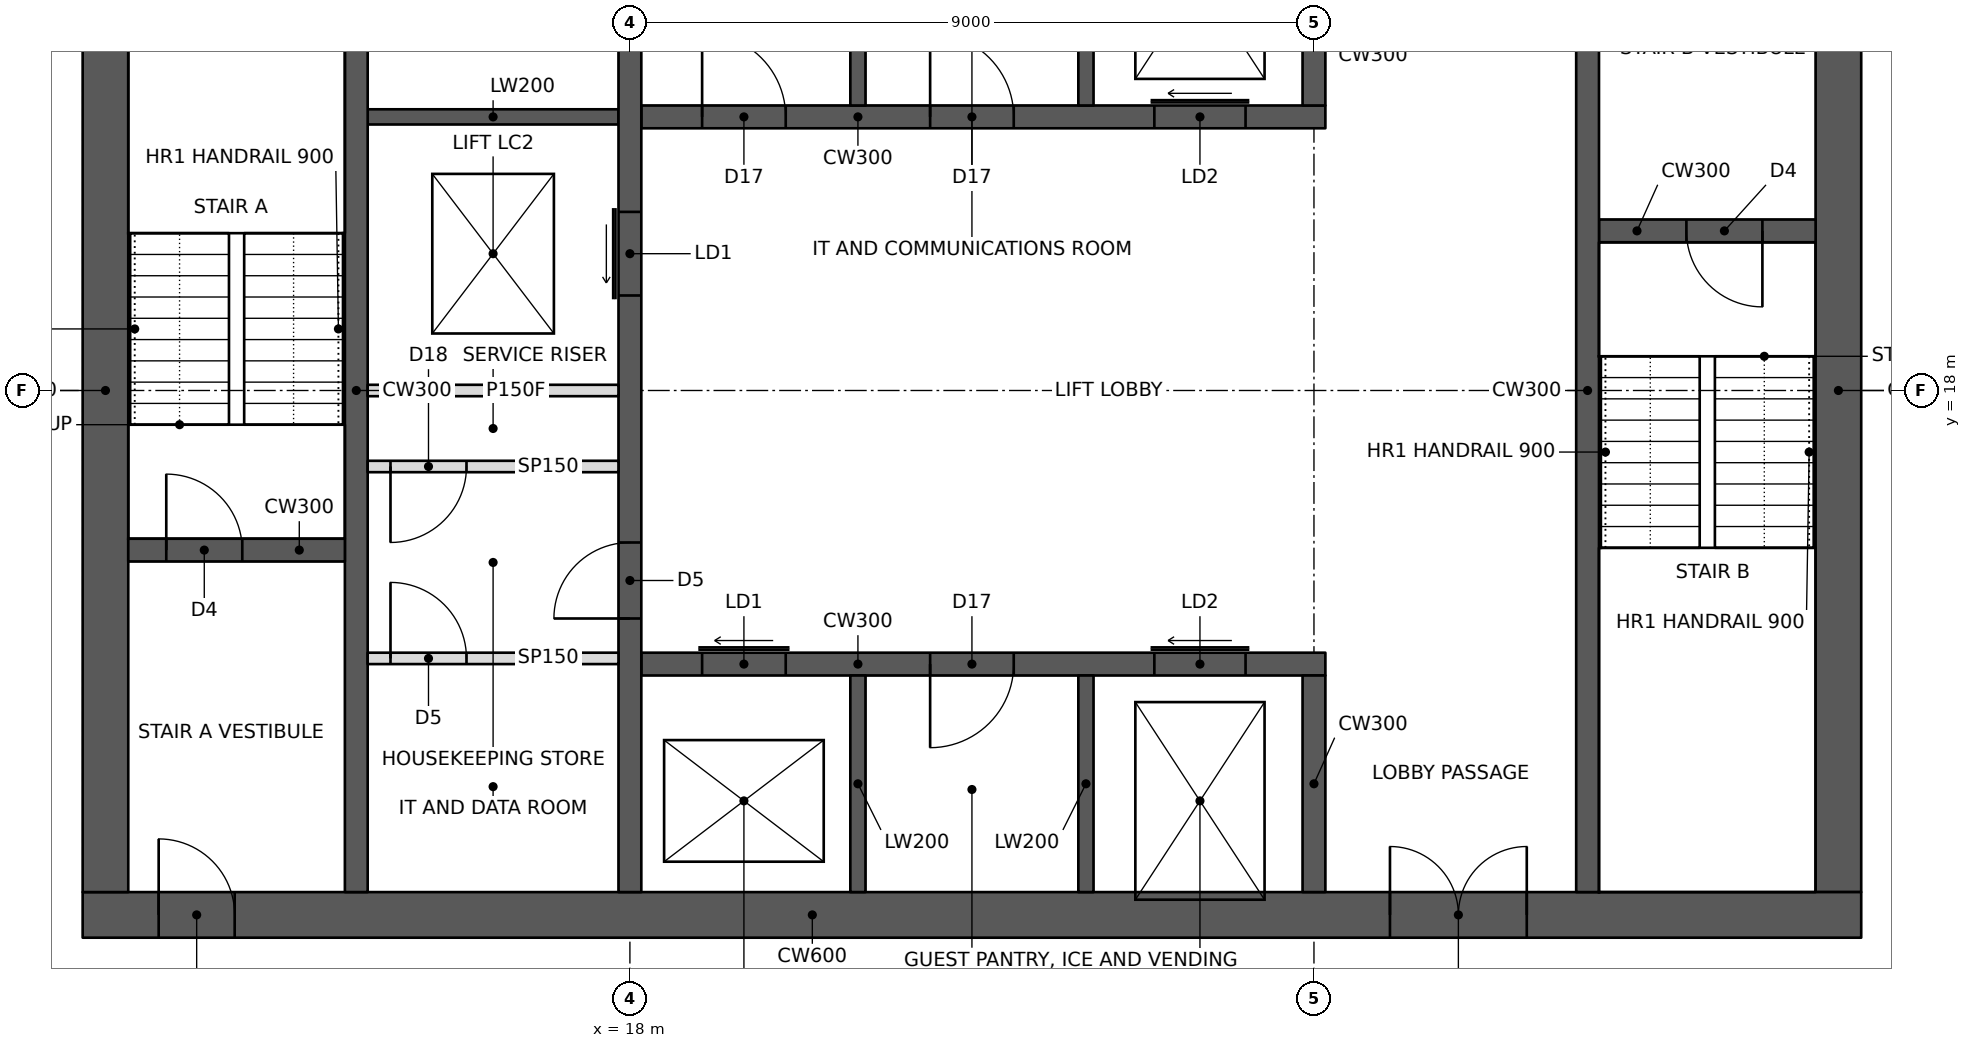
"""IFC4 building model, lengths in metres.
Left out: names, types, materials, properties, quantities, classifications, styles, units other than length and angle.
Written with IfcOpenShell. Run it as: python <this file> out.ifc"""

import sys

from ifc_helpers import new_model, si_unit, direction, frame, frame_2d, origin, place, context, subcontext, project, spatial, rectangle, extrude, element, fill, save


model = new_model("IFC4")
c1 = context("Model", 3, precision=1e-05, world=origin(), true_north=direction((0.0, 1.0)))
c2 = subcontext(c1, "Body", "Model", "MODEL_VIEW")
j1 = project(units=[si_unit("LENGTHUNIT", "METRE"), si_unit("PLANEANGLEUNIT", "RADIAN")], contexts=[c1])
p1 = place(None, origin())
s1 = spatial("IfcSite", under=j1, at=p1, CompositionType="ELEMENT")
p2 = place(p1, origin())
s2 = spatial("IfcBuilding", under=s1, at=p2, CompositionType="ELEMENT")
p3 = place(p2, frame((0.0, 0.0, 201.2)))
s3 = spatial("IfcBuildingStorey", under=s2, at=p3, CompositionType="ELEMENT", Elevation=201.2)
p4 = place(p3, frame((10.8, 11.1, 0.0), z_axis=(0.0, 0.0, 1.0), x_axis=(1.0, 0.0, 0.0)))
e1 = element("IfcWall", 1, at=p4, inside=s3, PredefinedType="SHEAR", context=c2, shape_type="SweptSolid", body=[
    extrude(rectangle(XDim=23.4, YDim=0.6, at=frame_2d((11.7, 0.0))), origin(), (0.0, 0.0, 1.0), 3.4),
])
p5 = place(p4, frame((1.0, 0.0, 0.0)))
e2 = element("IfcOpeningElement", 2, at=p5, cuts=e1, PredefinedType="OPENING", context=c2, shape_type="SweptSolid", body=[
    extrude(rectangle(XDim=1.0, YDim=2.1, at=frame_2d((0.5, 1.05))), frame((0.0, 0.31, 0.0), z_axis=(0.0, -1.0, 0.0), x_axis=(1.0, 0.0, 0.0)), (0.0, 0.0, 1.0), 0.62),
])
p6 = place(p4, frame((17.2, 0.0, 0.0)))
e3 = element("IfcOpeningElement", 3, at=p6, cuts=e1, PredefinedType="OPENING", context=c2, shape_type="SweptSolid", body=[
    extrude(rectangle(XDim=1.8, YDim=2.1, at=frame_2d((0.9, 1.05))), frame((0.0, 0.31, 0.0), z_axis=(0.0, -1.0, 0.0), x_axis=(1.0, 0.0, 0.0)), (0.0, 0.0, 1.0), 0.62),
])
for number, where, z_axis, x_axis in (
    (4, (11.1, 11.4, 0.0), (0.0, 0.0, 1.0), (0.0, 1.0, 0.0)),
    (5, (33.9, 11.4, 0.0), (0.0, 0.0, 1.0), (0.0, 1.0, 0.0)),
):
    element("IfcWall", number, at=place(p3, frame(where, z_axis=z_axis, x_axis=x_axis)), inside=s3, PredefinedType="SHEAR", context=c2, shape_type="SweptSolid", body=[
        extrude(rectangle(XDim=13.2, YDim=0.6, at=frame_2d((6.6, 0.0))), origin(), (0.0, 0.0, 1.0), 3.4),
    ])
p7 = place(p3, frame((14.4, 11.4, 0.0), z_axis=(0.0, 0.0, 1.0), x_axis=(0.0, 1.0, 0.0)))
e6 = element("IfcWall", 6, at=p7, inside=s3, PredefinedType="SHEAR", context=c2, shape_type="SweptSolid", body=[
    extrude(rectangle(XDim=13.2, YDim=0.3, at=frame_2d((6.6, 0.0))), origin(), (0.0, 0.0, 1.0), 3.4),
])
p8 = place(p3, frame((11.4, 15.9, 0.0), z_axis=(0.0, 0.0, 1.0), x_axis=(1.0, 0.0, 0.0)))
e7 = element("IfcWall", 7, at=p8, inside=s3, PredefinedType="SHEAR", context=c2, shape_type="SweptSolid", body=[
    extrude(rectangle(XDim=2.85, YDim=0.3, at=frame_2d((1.425, 0.0))), origin(), (0.0, 0.0, 1.0), 3.4),
])
p9 = place(p8, frame((0.5, 0.0, 0.0)))
e8 = element("IfcOpeningElement", 8, at=p9, cuts=e7, PredefinedType="OPENING", context=c2, shape_type="SweptSolid", body=[
    extrude(rectangle(XDim=1.0, YDim=2.1, at=frame_2d((0.5, 1.05))), frame((0.0, 0.16, 0.0), z_axis=(0.0, -1.0, 0.0), x_axis=(1.0, 0.0, 0.0)), (0.0, 0.0, 1.0), 0.32),
])
p10 = place(p3, frame((18.0, 11.4, 0.0), z_axis=(0.0, 0.0, 1.0), x_axis=(0.0, 1.0, 0.0)))
e9 = element("IfcWall", 9, at=p10, inside=s3, PredefinedType="SHEAR", context=c2, shape_type="SweptSolid", body=[
    extrude(rectangle(XDim=13.2, YDim=0.3, at=frame_2d((6.6, 0.0))), origin(), (0.0, 0.0, 1.0), 3.4),
])
p11 = place(p10, frame((3.6, 0.0, 0.0)))
e10 = element("IfcOpeningElement", 10, at=p11, cuts=e9, PredefinedType="OPENING", context=c2, shape_type="SweptSolid", body=[
    extrude(rectangle(XDim=1.0, YDim=2.1, at=frame_2d((0.5, 1.05))), frame((0.0, 0.16, 0.0), z_axis=(0.0, -1.0, 0.0), x_axis=(1.0, 0.0, 0.0)), (0.0, 0.0, 1.0), 0.32),
])
p12 = place(p10, frame((7.85, 0.0, 0.0)))
e11 = element("IfcOpeningElement", 11, at=p12, cuts=e9, PredefinedType="OPENING", context=c2, shape_type="SweptSolid", body=[
    extrude(rectangle(XDim=1.1, YDim=2.1, at=frame_2d((0.55, 1.05))), frame((0.0, 0.16, 0.0), z_axis=(0.0, -1.0, 0.0), x_axis=(1.0, 0.0, 0.0)), (0.0, 0.0, 1.0), 0.32),
])
p13 = place(p3, frame((14.55, 18.0, 0.0), z_axis=(0.0, 0.0, 1.0), x_axis=(1.0, 0.0, 0.0)))
e12 = element("IfcWall", 12, at=p13, inside=s3, PredefinedType="PARTITIONING", context=c2, shape_type="SweptSolid", body=[
    extrude(rectangle(XDim=3.3, YDim=0.15, at=frame_2d((1.65, 0.0))), origin(), (0.0, 0.0, 1.0), 3.2),
])
p14 = place(p3, frame((18.15, 14.4, 0.0), z_axis=(0.0, 0.0, 1.0), x_axis=(1.0, 0.0, 0.0)))
e13 = element("IfcWall", 13, at=p14, inside=s3, PredefinedType="SHEAR", context=c2, shape_type="SweptSolid", body=[
    extrude(rectangle(XDim=9.0, YDim=0.3, at=frame_2d((4.5, 0.0))), origin(), (0.0, 0.0, 1.0), 3.4),
])
p15 = place(p14, frame((0.8, 0.0, 0.0)))
e14 = element("IfcOpeningElement", 14, at=p15, cuts=e13, PredefinedType="OPENING", context=c2, shape_type="SweptSolid", body=[
    extrude(rectangle(XDim=1.1, YDim=2.1, at=frame_2d((0.55, 1.05))), frame((0.0, 0.16, 0.0), z_axis=(0.0, -1.0, 0.0), x_axis=(1.0, 0.0, 0.0)), (0.0, 0.0, 1.0), 0.32),
])
p16 = place(p14, frame((6.75, 0.0, 0.0)))
e15 = element("IfcOpeningElement", 15, at=p16, cuts=e13, PredefinedType="OPENING", context=c2, shape_type="SweptSolid", body=[
    extrude(rectangle(XDim=1.2, YDim=2.1, at=frame_2d((0.6, 1.05))), frame((0.0, 0.16, 0.0), z_axis=(0.0, -1.0, 0.0), x_axis=(1.0, 0.0, 0.0)), (0.0, 0.0, 1.0), 0.32),
])
p17 = place(p14, frame((3.8, 0.0, 0.0)))
e16 = element("IfcOpeningElement", 16, at=p17, cuts=e13, PredefinedType="OPENING", context=c2, shape_type="SweptSolid", body=[
    extrude(rectangle(XDim=1.1, YDim=2.1, at=frame_2d((0.55, 1.05))), frame((0.0, 0.16, 0.0), z_axis=(0.0, -1.0, 0.0), x_axis=(1.0, 0.0, 0.0)), (0.0, 0.0, 1.0), 0.32),
])
p18 = place(p3, frame((27.0, 11.4, 0.0), z_axis=(0.0, 0.0, 1.0), x_axis=(0.0, 1.0, 0.0)))
e17 = element("IfcWall", 17, at=p18, inside=s3, PredefinedType="SHEAR", context=c2, shape_type="SweptSolid", body=[
    extrude(rectangle(XDim=2.85, YDim=0.3, at=frame_2d((1.425, 0.0))), origin(), (0.0, 0.0, 1.0), 3.4),
])
for number, where, z_axis, x_axis in (
    (18, (21.0, 11.4, 0.0), (0.0, 0.0, 1.0), (0.0, 1.0, 0.0)),
    (19, (24.0, 11.4, 0.0), (0.0, 0.0, 1.0), (0.0, 1.0, 0.0)),
):
    element("IfcWall", number, at=place(p3, frame(where, z_axis=z_axis, x_axis=x_axis)), inside=s3, PredefinedType="SHEAR", context=c2, shape_type="SweptSolid", body=[
        extrude(rectangle(XDim=2.85, YDim=0.2, at=frame_2d((1.425, 0.0))), origin(), (0.0, 0.0, 1.0), 3.4),
    ])
p19 = place(p3, frame((18.15, 21.6, 0.0), z_axis=(0.0, 0.0, 1.0), x_axis=(1.0, 0.0, 0.0)))
e20 = element("IfcWall", 20, at=p19, inside=s3, PredefinedType="SHEAR", context=c2, shape_type="SweptSolid", body=[
    extrude(rectangle(XDim=9.0, YDim=0.3, at=frame_2d((4.5, 0.0))), origin(), (0.0, 0.0, 1.0), 3.4),
])
p20 = place(p19, frame((6.75, 0.0, 0.0)))
e21 = element("IfcOpeningElement", 21, at=p20, cuts=e20, PredefinedType="OPENING", context=c2, shape_type="SweptSolid", body=[
    extrude(rectangle(XDim=1.2, YDim=2.1, at=frame_2d((0.6, 1.05))), frame((0.0, 0.16, 0.0), z_axis=(0.0, -1.0, 0.0), x_axis=(1.0, 0.0, 0.0)), (0.0, 0.0, 1.0), 0.32),
])
p21 = place(p19, frame((0.8, 0.0, 0.0)))
e22 = element("IfcOpeningElement", 22, at=p21, cuts=e20, PredefinedType="OPENING", context=c2, shape_type="SweptSolid", body=[
    extrude(rectangle(XDim=1.1, YDim=2.1, at=frame_2d((0.55, 1.05))), frame((0.0, 0.16, 0.0), z_axis=(0.0, -1.0, 0.0), x_axis=(1.0, 0.0, 0.0)), (0.0, 0.0, 1.0), 0.32),
])
p22 = place(p19, frame((3.8, 0.0, 0.0)))
e23 = element("IfcOpeningElement", 23, at=p22, cuts=e20, PredefinedType="OPENING", context=c2, shape_type="SweptSolid", body=[
    extrude(rectangle(XDim=1.1, YDim=2.1, at=frame_2d((0.55, 1.05))), frame((0.0, 0.16, 0.0), z_axis=(0.0, -1.0, 0.0), x_axis=(1.0, 0.0, 0.0)), (0.0, 0.0, 1.0), 0.32),
])
p23 = place(p3, frame((27.0, 21.75, 0.0), z_axis=(0.0, 0.0, 1.0), x_axis=(0.0, 1.0, 0.0)))
e24 = element("IfcWall", 24, at=p23, inside=s3, PredefinedType="SHEAR", context=c2, shape_type="SweptSolid", body=[
    extrude(rectangle(XDim=2.85, YDim=0.3, at=frame_2d((1.425, 0.0))), origin(), (0.0, 0.0, 1.0), 3.4),
])
for number, where, z_axis, x_axis in (
    (25, (21.0, 21.75, 0.0), (0.0, 0.0, 1.0), (0.0, 1.0, 0.0)),
    (26, (24.0, 21.75, 0.0), (0.0, 0.0, 1.0), (0.0, 1.0, 0.0)),
):
    element("IfcWall", number, at=place(p3, frame(where, z_axis=z_axis, x_axis=x_axis)), inside=s3, PredefinedType="SHEAR", context=c2, shape_type="SweptSolid", body=[
        extrude(rectangle(XDim=2.85, YDim=0.2, at=frame_2d((1.425, 0.0))), origin(), (0.0, 0.0, 1.0), 3.4),
    ])
p24 = place(p3, frame((30.6, 11.4, 0.0), z_axis=(0.0, 0.0, 1.0), x_axis=(0.0, 1.0, 0.0)))
e27 = element("IfcWall", 27, at=p24, inside=s3, PredefinedType="SHEAR", context=c2, shape_type="SweptSolid", body=[
    extrude(rectangle(XDim=13.2, YDim=0.3, at=frame_2d((6.6, 0.0))), origin(), (0.0, 0.0, 1.0), 3.4),
])
p25 = place(p3, frame((30.75, 20.1, 0.0), z_axis=(0.0, 0.0, 1.0), x_axis=(1.0, 0.0, 0.0)))
e28 = element("IfcWall", 28, at=p25, inside=s3, PredefinedType="SHEAR", context=c2, shape_type="SweptSolid", body=[
    extrude(rectangle(XDim=2.85, YDim=0.3, at=frame_2d((1.425, 0.0))), origin(), (0.0, 0.0, 1.0), 3.4),
])
p26 = place(p25, frame((1.15, 0.0, 0.0)))
e29 = element("IfcOpeningElement", 29, at=p26, cuts=e28, PredefinedType="OPENING", context=c2, shape_type="SweptSolid", body=[
    extrude(rectangle(XDim=1.0, YDim=2.1, at=frame_2d((0.5, 1.05))), frame((0.0, 0.16, 0.0), z_axis=(0.0, -1.0, 0.0), x_axis=(1.0, 0.0, 0.0)), (0.0, 0.0, 1.0), 0.32),
])
p27 = place(p3, frame((14.55, 21.6, 0.0), z_axis=(0.0, 0.0, 1.0), x_axis=(1.0, 0.0, 0.0)))
e30 = element("IfcWall", 30, at=p27, inside=s3, PredefinedType="SHEAR", context=c2, shape_type="SweptSolid", body=[
    extrude(rectangle(XDim=3.3, YDim=0.2, at=frame_2d((1.65, 0.0))), origin(), (0.0, 0.0, 1.0), 3.4),
])
p28 = place(p3, frame((14.55, 17.0, 0.0), z_axis=(0.0, 0.0, 1.0), x_axis=(1.0, 0.0, 0.0)))
e31 = element("IfcWall", 31, at=p28, inside=s3, PredefinedType="PARTITIONING", context=c2, shape_type="SweptSolid", body=[
    extrude(rectangle(XDim=3.3, YDim=0.15, at=frame_2d((1.65, 0.0))), origin(), (0.0, 0.0, 1.0), 3.2),
])
p29 = place(p28, frame((0.3, 0.0, 0.0)))
e32 = element("IfcOpeningElement", 32, at=p29, cuts=e31, PredefinedType="OPENING", context=c2, shape_type="SweptSolid", body=[
    extrude(rectangle(XDim=1.0, YDim=2.1, at=frame_2d((0.5, 1.05))), frame((0.0, 0.085, 0.0), z_axis=(0.0, -1.0, 0.0), x_axis=(1.0, 0.0, 0.0)), (0.0, 0.0, 1.0), 0.17),
])
p30 = place(p3, frame((14.55, 14.475, 0.0), z_axis=(0.0, 0.0, 1.0), x_axis=(1.0, 0.0, 0.0)))
e33 = element("IfcWall", 33, at=p30, inside=s3, PredefinedType="PARTITIONING", context=c2, shape_type="SweptSolid", body=[
    extrude(rectangle(XDim=3.3, YDim=0.15, at=frame_2d((1.65, 0.0))), origin(), (0.0, 0.0, 1.0), 3.2),
])
p31 = place(p30, frame((0.3, 0.0, 0.0)))
e34 = element("IfcOpeningElement", 34, at=p31, cuts=e33, PredefinedType="OPENING", context=c2, shape_type="SweptSolid", body=[
    extrude(rectangle(XDim=1.0, YDim=2.1, at=frame_2d((0.5, 1.05))), frame((0.0, 0.085, 0.0), z_axis=(0.0, -1.0, 0.0), x_axis=(1.0, 0.0, 0.0)), (0.0, 0.0, 1.0), 0.17),
])
p32 = place(p29, frame((1.0, 0.0, 0.0), z_axis=(0.0, 0.0, 1.0), x_axis=(-1.0, 0.0, 0.0)))
e35 = element("IfcDoor", 35, at=p32, inside=s3, OperationType="SINGLE_SWING_RIGHT", PredefinedType="DOOR", context=c2, shape_type="SweptSolid", body=[
    extrude(rectangle(XDim=1.0, YDim=2.1, at=frame_2d((0.5, 1.05))), frame((0.0, 0.025, 0.0), z_axis=(0.0, -1.0, 0.0), x_axis=(1.0, 0.0, 0.0)), (0.0, 0.0, 1.0), 0.05),
])
fill(e32, e35)
p33 = place(p31, origin())
e36 = element("IfcDoor", 36, at=p33, inside=s3, OperationType="SINGLE_SWING_LEFT", PredefinedType="DOOR", context=c2, shape_type="SweptSolid", body=[
    extrude(rectangle(XDim=1.0, YDim=2.1, at=frame_2d((0.5, 1.05))), frame((0.0, 0.025, 0.0), z_axis=(0.0, -1.0, 0.0), x_axis=(1.0, 0.0, 0.0)), (0.0, 0.0, 1.0), 0.05),
])
fill(e34, e36)
p34 = place(p5, origin())
e37 = element("IfcDoor", 37, at=p34, inside=s3, OperationType="SINGLE_SWING_LEFT", PredefinedType="DOOR", context=c2, shape_type="SweptSolid", body=[
    extrude(rectangle(XDim=1.0, YDim=2.1, at=frame_2d((0.5, 1.05))), frame((0.0, 0.025, 0.0), z_axis=(0.0, -1.0, 0.0), x_axis=(1.0, 0.0, 0.0)), (0.0, 0.0, 1.0), 0.05),
])
fill(e2, e37)
p35 = place(p9, origin())
e38 = element("IfcDoor", 38, at=p35, inside=s3, OperationType="SINGLE_SWING_LEFT", PredefinedType="DOOR", context=c2, shape_type="SweptSolid", body=[
    extrude(rectangle(XDim=1.0, YDim=2.1, at=frame_2d((0.5, 1.05))), frame((0.0, 0.025, 0.0), z_axis=(0.0, -1.0, 0.0), x_axis=(1.0, 0.0, 0.0)), (0.0, 0.0, 1.0), 0.05),
])
fill(e8, e38)
p36 = place(p6, origin())
e39 = element("IfcDoor", 39, at=p36, inside=s3, OperationType="DOUBLE_DOOR_SINGLE_SWING", PredefinedType="DOOR", context=c2, shape_type="SweptSolid", body=[
    extrude(rectangle(XDim=1.8, YDim=2.1, at=frame_2d((0.9, 1.05))), frame((0.0, 0.025, 0.0), z_axis=(0.0, -1.0, 0.0), x_axis=(1.0, 0.0, 0.0)), (0.0, 0.0, 1.0), 0.05),
])
fill(e3, e39)
p37 = place(p26, frame((1.0, 0.0, 0.0), z_axis=(0.0, 0.0, 1.0), x_axis=(-1.0, 0.0, 0.0)))
e40 = element("IfcDoor", 40, at=p37, inside=s3, OperationType="SINGLE_SWING_LEFT", PredefinedType="DOOR", context=c2, shape_type="SweptSolid", body=[
    extrude(rectangle(XDim=1.0, YDim=2.1, at=frame_2d((0.5, 1.05))), frame((0.0, 0.025, 0.0), z_axis=(0.0, -1.0, 0.0), x_axis=(1.0, 0.0, 0.0)), (0.0, 0.0, 1.0), 0.05),
])
fill(e29, e40)
p38 = place(p11, origin())
e41 = element("IfcDoor", 41, at=p38, inside=s3, OperationType="SINGLE_SWING_LEFT", PredefinedType="DOOR", context=c2, shape_type="SweptSolid", body=[
    extrude(rectangle(XDim=1.0, YDim=2.1, at=frame_2d((0.5, 1.05))), frame((0.0, 0.025, 0.0), z_axis=(0.0, -1.0, 0.0), x_axis=(1.0, 0.0, 0.0)), (0.0, 0.0, 1.0), 0.05),
])
fill(e10, e41)
p39 = place(p15, origin())
e42 = element("IfcDoor", 42, at=p39, inside=s3, OperationType="SLIDING_TO_LEFT", PredefinedType="DOOR", context=c2, shape_type="SweptSolid", body=[
    extrude(rectangle(XDim=1.1, YDim=2.1, at=frame_2d((0.55, 1.05))), frame((0.0, 0.025, 0.0), z_axis=(0.0, -1.0, 0.0), x_axis=(1.0, 0.0, 0.0)), (0.0, 0.0, 1.0), 0.05),
])
fill(e14, e42)
p40 = place(p12, origin())
e43 = element("IfcDoor", 43, at=p40, inside=s3, OperationType="SLIDING_TO_LEFT", PredefinedType="DOOR", context=c2, shape_type="SweptSolid", body=[
    extrude(rectangle(XDim=1.1, YDim=2.1, at=frame_2d((0.55, 1.05))), frame((0.0, 0.025, 0.0), z_axis=(0.0, -1.0, 0.0), x_axis=(1.0, 0.0, 0.0)), (0.0, 0.0, 1.0), 0.05),
])
fill(e11, e43)
p41 = place(p16, origin())
e44 = element("IfcDoor", 44, at=p41, inside=s3, OperationType="SLIDING_TO_LEFT", PredefinedType="DOOR", context=c2, shape_type="SweptSolid", body=[
    extrude(rectangle(XDim=1.2, YDim=2.1, at=frame_2d((0.6, 1.05))), frame((0.0, 0.025, 0.0), z_axis=(0.0, -1.0, 0.0), x_axis=(1.0, 0.0, 0.0)), (0.0, 0.0, 1.0), 0.05),
])
fill(e15, e44)
p42 = place(p20, origin())
e45 = element("IfcDoor", 45, at=p42, inside=s3, OperationType="SLIDING_TO_LEFT", PredefinedType="DOOR", context=c2, shape_type="SweptSolid", body=[
    extrude(rectangle(XDim=1.2, YDim=2.1, at=frame_2d((0.6, 1.05))), frame((0.0, 0.025, 0.0), z_axis=(0.0, -1.0, 0.0), x_axis=(1.0, 0.0, 0.0)), (0.0, 0.0, 1.0), 0.05),
])
fill(e21, e45)
p43 = place(p21, origin())
e46 = element("IfcDoor", 46, at=p43, inside=s3, OperationType="SINGLE_SWING_LEFT", PredefinedType="DOOR", context=c2, shape_type="SweptSolid", body=[
    extrude(rectangle(XDim=1.1, YDim=2.1, at=frame_2d((0.55, 1.05))), frame((0.0, 0.025, 0.0), z_axis=(0.0, -1.0, 0.0), x_axis=(1.0, 0.0, 0.0)), (0.0, 0.0, 1.0), 0.05),
])
fill(e22, e46)
p44 = place(p22, origin())
e47 = element("IfcDoor", 47, at=p44, inside=s3, OperationType="SINGLE_SWING_LEFT", PredefinedType="DOOR", context=c2, shape_type="SweptSolid", body=[
    extrude(rectangle(XDim=1.1, YDim=2.1, at=frame_2d((0.55, 1.05))), frame((0.0, 0.025, 0.0), z_axis=(0.0, -1.0, 0.0), x_axis=(1.0, 0.0, 0.0)), (0.0, 0.0, 1.0), 0.05),
])
fill(e23, e47)
p45 = place(p17, frame((1.1, 0.0, 0.0), z_axis=(0.0, 0.0, 1.0), x_axis=(-1.0, 0.0, 0.0)))
e48 = element("IfcDoor", 48, at=p45, inside=s3, OperationType="SINGLE_SWING_RIGHT", PredefinedType="DOOR", context=c2, shape_type="SweptSolid", body=[
    extrude(rectangle(XDim=1.1, YDim=2.1, at=frame_2d((0.55, 1.05))), frame((0.0, 0.025, 0.0), z_axis=(0.0, -1.0, 0.0), x_axis=(1.0, 0.0, 0.0)), (0.0, 0.0, 1.0), 0.05),
])
fill(e16, e48)
save(model, sys.argv[1])
